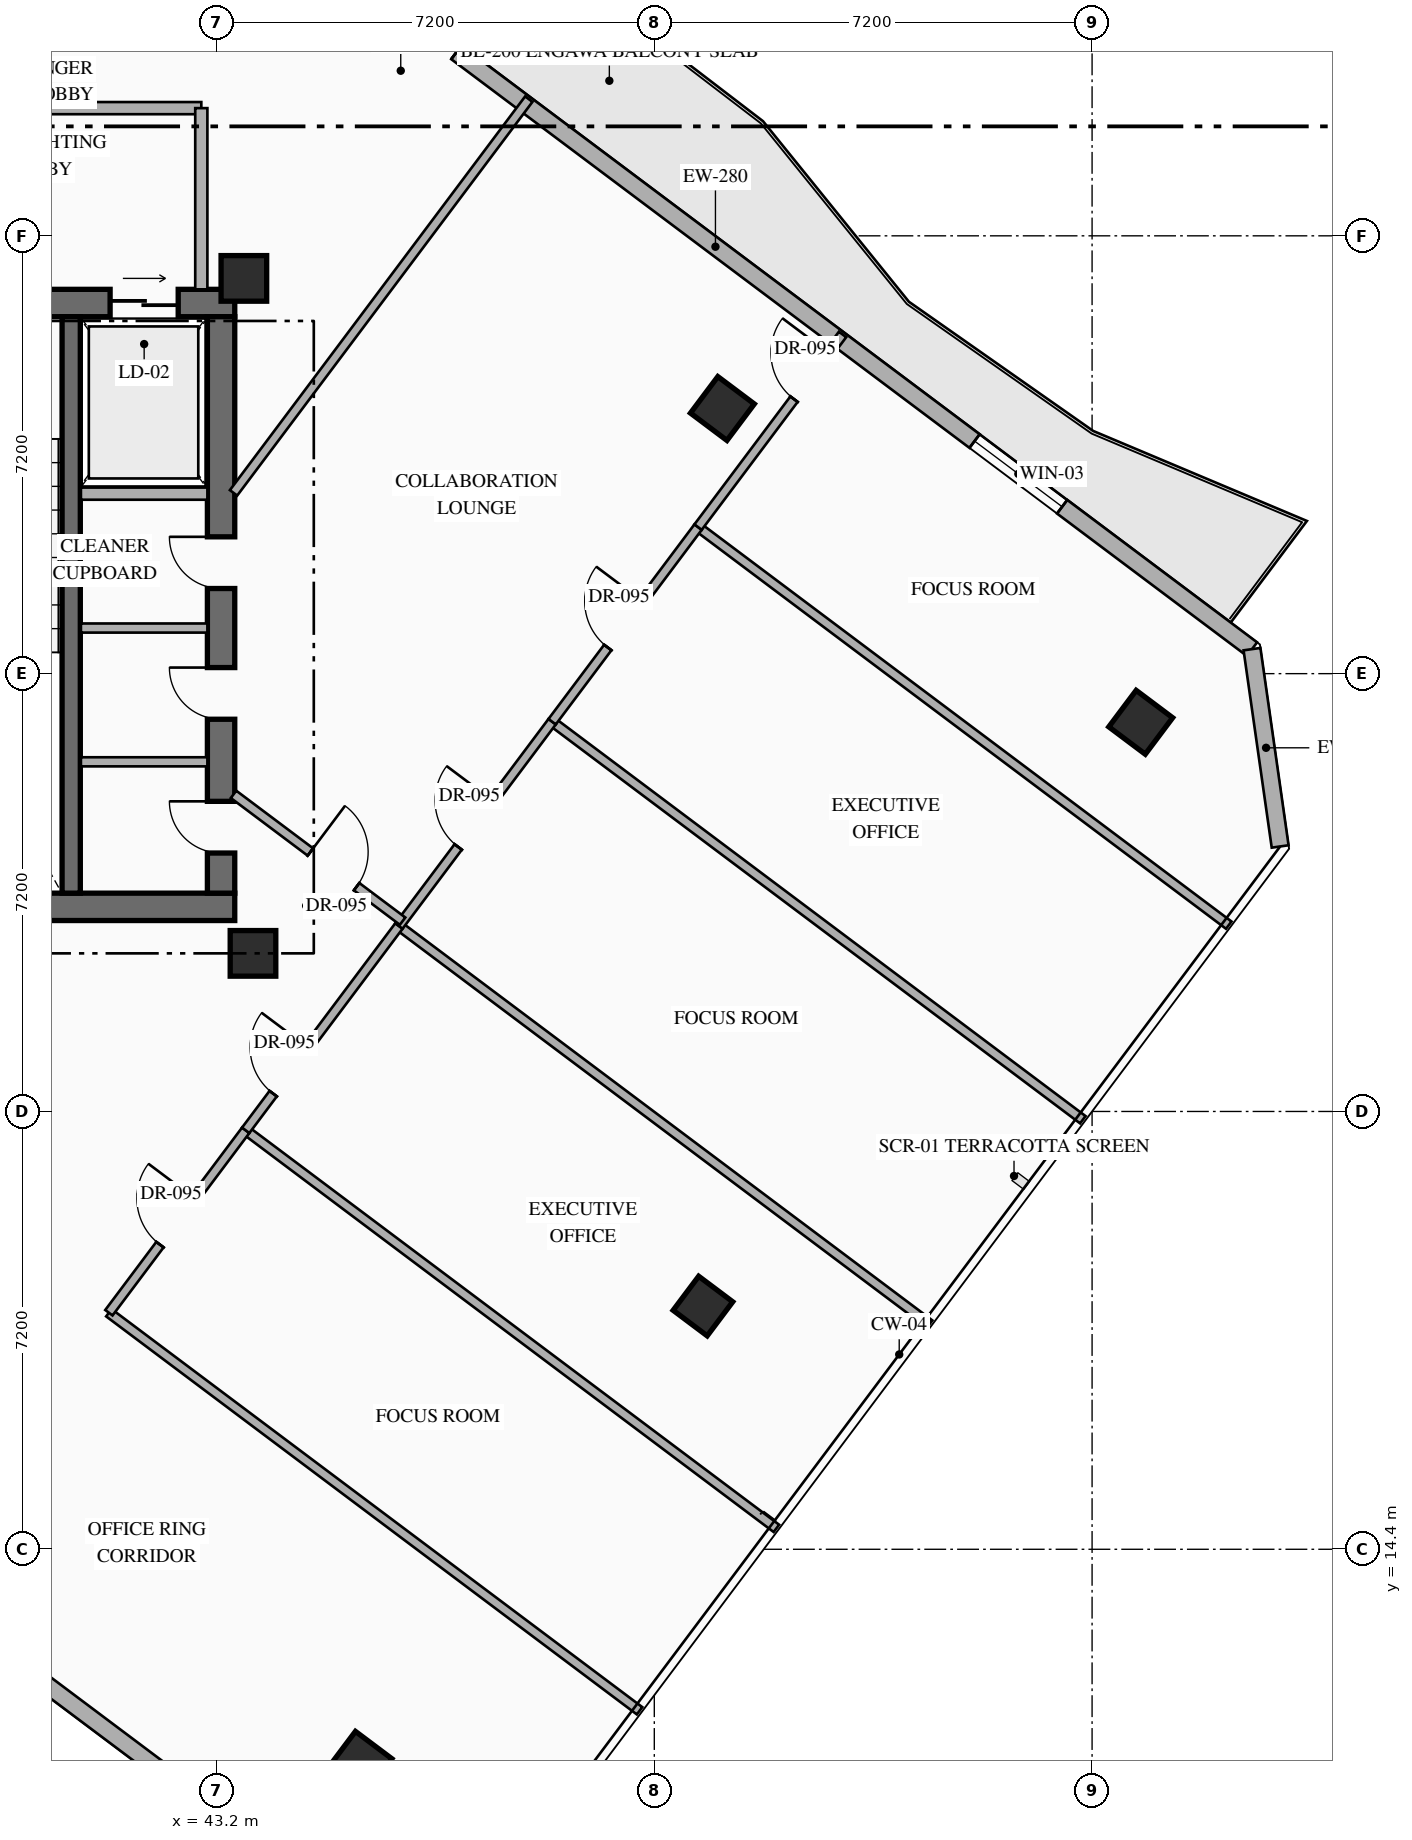
"""IFC4 building model, lengths in metres.
Left out: names, types, materials, properties, quantities, classifications, styles, units other than length and angle.
Written with IfcOpenShell. Run it as: python <this file> out.ifc"""

import sys

from ifc_helpers import new_model, si_unit, direction, frame, frame_2d, origin, origin_2d, place, context, subcontext, project, spatial, rectangle, hollow_rectangle, extrude, element, fill, save


model = new_model("IFC4")
c1 = context("Model", 3, precision=1e-05, world=origin(), true_north=direction((0.0, 1.0)))
c2 = subcontext(c1, "Body", "Model", "MODEL_VIEW")
j1 = project(units=[si_unit("LENGTHUNIT", "METRE"), si_unit("PLANEANGLEUNIT", "RADIAN")], contexts=[c1])
p1 = place(None, origin())
s1 = spatial("IfcSite", under=j1, at=p1, CompositionType="ELEMENT")
p2 = place(p1, origin())
s2 = spatial("IfcBuilding", under=s1, at=p2, CompositionType="ELEMENT")
p3 = place(p2, frame((0.0, 0.0, 195.15)))
s3 = spatial("IfcBuildingStorey", under=s2, at=p3, CompositionType="ELEMENT", Elevation=195.15)
p4 = place(p3, frame((36.04, 24.965, 0.0), z_axis=(0.0, 0.0, 1.0), x_axis=(1.0, 0.0, 0.0)))
e1 = element("IfcWall", 1, at=p4, inside=s3, PredefinedType="SHEAR", context=c2, shape_type="SweptSolid", body=[
    extrude(rectangle(XDim=7.46, YDim=0.45, at=frame_2d((3.73, 0.0))), origin(), (0.0, 0.0, 1.0), 3.6),
])
p5 = place(p3, frame((36.04, 34.895, 0.0), z_axis=(0.0, 0.0, 1.0), x_axis=(1.0, 0.0, 0.0)))
e2 = element("IfcWall", 2, at=p5, inside=s3, PredefinedType="SHEAR", context=c2, shape_type="SweptSolid", body=[
    extrude(rectangle(XDim=7.46, YDim=0.45, at=frame_2d((3.73, 0.0))), origin(), (0.0, 0.0, 1.0), 3.6),
])
p6 = place(p5, frame((2.51, 0.0, 0.0)))
e3 = element("IfcOpeningElement", 3, at=p6, cuts=e2, PredefinedType="OPENING", context=c2, shape_type="SweptSolid", body=[
    extrude(rectangle(XDim=1.1, YDim=2.2, at=frame_2d((0.55, 1.1))), frame((0.0, 0.235, 0.0), z_axis=(0.0, -1.0, 0.0), x_axis=(1.0, 0.0, 0.0)), (0.0, 0.0, 1.0), 0.47),
])
p7 = place(p5, frame((5.41, 0.0, 0.0)))
e4 = element("IfcOpeningElement", 4, at=p7, cuts=e2, PredefinedType="OPENING", context=c2, shape_type="SweptSolid", body=[
    extrude(rectangle(XDim=1.12, YDim=2.15, at=frame_2d((0.56, 1.075))), frame((0.0, 0.235, 0.0), z_axis=(0.0, -1.0, 0.0), x_axis=(1.0, 0.0, 0.0)), (0.0, 0.0, 1.0), 0.47),
])
p8 = place(p3, frame((43.275, 25.19, 0.0), z_axis=(0.0, 0.0, 1.0), x_axis=(0.0, 1.0, 0.0)))
e5 = element("IfcWall", 5, at=p8, inside=s3, PredefinedType="SHEAR", context=c2, shape_type="SweptSolid", body=[
    extrude(rectangle(XDim=9.48, YDim=0.45, at=frame_2d((4.74, 0.0))), origin(), (0.0, 0.0, 1.0), 3.6),
])
p9 = place(p8, frame((0.66, 0.0, 0.0)))
e6 = element("IfcOpeningElement", 6, at=p9, cuts=e5, PredefinedType="OPENING", context=c2, shape_type="SweptSolid", body=[
    extrude(rectangle(XDim=0.85, YDim=2.08, at=frame_2d((0.425, 1.04))), frame((0.0, 0.235, 0.0), z_axis=(0.0, -1.0, 0.0), x_axis=(1.0, 0.0, 0.0)), (0.0, 0.0, 1.0), 0.47),
])
p10 = place(p8, frame((2.86, 0.0, 0.0)))
e7 = element("IfcOpeningElement", 7, at=p10, cuts=e5, PredefinedType="OPENING", context=c2, shape_type="SweptSolid", body=[
    extrude(rectangle(XDim=0.85, YDim=2.08, at=frame_2d((0.425, 1.04))), frame((0.0, 0.235, 0.0), z_axis=(0.0, -1.0, 0.0), x_axis=(1.0, 0.0, 0.0)), (0.0, 0.0, 1.0), 0.47),
])
p11 = place(p8, frame((5.01, 0.0, 0.0)))
e8 = element("IfcOpeningElement", 8, at=p11, cuts=e5, PredefinedType="OPENING", context=c2, shape_type="SweptSolid", body=[
    extrude(rectangle(XDim=0.85, YDim=2.08, at=frame_2d((0.425, 1.04))), frame((0.0, 0.235, 0.0), z_axis=(0.0, -1.0, 0.0), x_axis=(1.0, 0.0, 0.0)), (0.0, 0.0, 1.0), 0.47),
])
p12 = place(p3, frame((40.81, 25.19, 0.0), z_axis=(0.0, 0.0, 1.0), x_axis=(0.0, 1.0, 0.0)))
e9 = element("IfcWall", 9, at=p12, inside=s3, PredefinedType="SHEAR", context=c2, shape_type="SweptSolid", body=[
    extrude(rectangle(XDim=9.48, YDim=0.3, at=frame_2d((4.74, 0.0))), origin(), (0.0, 0.0, 1.0), 3.6),
])
for number, where, z_axis, x_axis in (
    (10, (43.8, 24.2, 0.0), (0.0, 0.0, 1.0), (1.0, 0.0, 0.0)),
    (11, (43.65, 35.3, 0.0), (0.0, 0.0, 1.0), (1.0, 0.0, 0.0)),
    (12, (51.52, 33.16, 0.0), (0.0, 0.0, 1.0), (0.8, -0.6, 0.0)),
    (13, (45.56, 10.88, 0.0), (0.0, 0.0, 1.0), (0.8, -0.6, 0.0)),
    (14, (58.4, 28.0, 0.0), (0.0, 0.0, 1.0), (0.8, -0.6, 0.0)),
):
    element("IfcColumn", number, at=place(p3, frame(where, z_axis=z_axis, x_axis=x_axis)), inside=s3, PredefinedType="COLUMN", context=c2, shape_type="SweptSolid", body=[
        extrude(hollow_rectangle(XDim=0.75, YDim=0.75, WallThickness=0.028, at=origin_2d()), origin(), (0.0, 0.0, 1.0), 3.6),
    ])
p13 = place(p3, frame((51.2, 18.4, 0.0), z_axis=(0.0, 0.0, 1.0), x_axis=(0.799999996291, -0.600000004945, 0.0)))
e15 = element("IfcColumn", 15, at=p13, inside=s3, PredefinedType="COLUMN", context=c2, shape_type="SweptSolid", body=[
    extrude(hollow_rectangle(XDim=0.7, YDim=0.7, WallThickness=0.028, at=origin_2d()), origin(), (0.0, 0.0, 1.0), 3.6),
])
p14 = place(p3, frame((44.86, 40.73, 0.0), z_axis=(0.0, 0.0, 1.0), x_axis=(0.800007624502, -0.599989833863, 0.0)))
e16 = element("IfcWall", 16, at=p14, inside=s3, PredefinedType="STANDARD", context=c2, shape_type="SweptSolid", body=[
    extrude(rectangle(XDim=19.212, YDim=0.28, at=frame_2d((9.606, 0.0))), origin(), (0.0, 0.0, 1.0), 3.35),
])
p15 = place(p14, frame((1.755, 0.0, 0.0)))
e17 = element("IfcOpeningElement", 17, at=p15, cuts=e16, PredefinedType="OPENING", context=c2, shape_type="SweptSolid", body=[
    extrude(rectangle(XDim=1.1, YDim=2.2, at=frame_2d((0.55, 1.1))), frame((0.0, 0.15, 0.0), z_axis=(0.0, -1.0, 0.0), x_axis=(1.0, 0.0, 0.0)), (0.0, 0.0, 1.0), 0.3),
])
p16 = place(p14, frame((13.509, 0.0, 0.85)))
e18 = element("IfcOpeningElement", 18, at=p16, cuts=e16, PredefinedType="OPENING", context=c2, shape_type="SweptSolid", body=[
    extrude(rectangle(XDim=1.8, YDim=2.1, at=frame_2d((0.9, 1.05))), frame((0.0, 0.15, 0.0), z_axis=(0.0, -1.0, 0.0), x_axis=(1.0, 0.0, 0.0)), (0.0, 0.0, 1.0), 0.3),
])
p17 = place(p3, frame((60.23, 29.203, 0.0), z_axis=(0.0, 0.0, 1.0), x_axis=(0.141296221922, -0.989967361922, 0.0)))
e19 = element("IfcWall", 19, at=p17, inside=s3, PredefinedType="STANDARD", context=c2, shape_type="SweptSolid", body=[
    extrude(rectangle(XDim=3.278, YDim=0.28, at=frame_2d((1.639, 0.0))), origin(), (0.0, 0.0, 1.0), 3.35),
])
p18 = place(p3, frame((44.918, 8.787, 0.0), z_axis=(0.0, 0.0, 1.0), x_axis=(-0.800004765927, 0.599993645378, 0.0)))
e20 = element("IfcWall", 20, at=p18, inside=s3, PredefinedType="STANDARD", context=c2, shape_type="SweptSolid", body=[
    extrude(rectangle(XDim=24.588, YDim=0.28, at=frame_2d((12.294, 0.0))), origin(), (0.0, 0.0, 1.0), 3.35),
])
p19 = place(p3, frame((40.97, 31.76, 0.0), z_axis=(0.0, 0.0, 1.0), x_axis=(1.0, 0.0, 0.0)))
e21 = element("IfcWall", 21, at=p19, inside=s3, PredefinedType="STANDARD", context=c2, shape_type="SweptSolid", body=[
    extrude(rectangle(XDim=2.08, YDim=0.2, at=frame_2d((1.04, 0.0))), origin(), (0.0, 0.0, 1.0), 3.35),
])
for number, where, z_axis, x_axis in (
    (22, (40.97, 27.35, 0.0), (0.0, 0.0, 1.0), (1.0, 0.0, 0.0)),
    (23, (40.97, 29.55, 0.0), (0.0, 0.0, 1.0), (1.0, 0.0, 0.0)),
):
    element("IfcWall", number, at=place(p3, frame(where, z_axis=z_axis, x_axis=x_axis)), inside=s3, PredefinedType="PARTITIONING", context=c2, shape_type="SweptSolid", body=[
        extrude(rectangle(XDim=2.08, YDim=0.15, at=frame_2d((1.04, 0.0))), origin(), (0.0, 0.0, 1.0), 3.35),
    ])
p20 = place(p3, frame((37.65, 38.1, 0.0), z_axis=(0.0, 0.0, 1.0), x_axis=(1.0, 0.0, 0.0)))
e24 = element("IfcWall", 24, at=p20, inside=s3, PredefinedType="STANDARD", context=c2, shape_type="SweptSolid", body=[
    extrude(rectangle(XDim=5.3, YDim=0.2, at=frame_2d((2.65, 0.0))), origin(), (0.0, 0.0, 1.0), 3.35),
])
p21 = place(p3, frame((42.95, 35.12, 0.0), z_axis=(0.0, 0.0, 1.0), x_axis=(0.0, 1.0, 0.0)))
e25 = element("IfcWall", 25, at=p21, inside=s3, PredefinedType="STANDARD", context=c2, shape_type="SweptSolid", body=[
    extrude(rectangle(XDim=2.98, YDim=0.2, at=frame_2d((1.49, 0.0))), origin(), (0.0, 0.0, 1.0), 3.35),
])
for number, where, z_axis, x_axis in (
    (26, (41.43, 18.29, 0.0), (0.0, 0.0, 1.0), (0.8, -0.6, 0.0)),
    (27, (43.68, 21.29, 0.0), (0.0, 0.0, 1.0), (0.8, -0.6, 0.0)),
):
    element("IfcWall", number, at=place(p3, frame(where, z_axis=z_axis, x_axis=x_axis)), inside=s3, PredefinedType="PARTITIONING", context=c2, shape_type="SweptSolid", body=[
        extrude(rectangle(XDim=10.91, YDim=0.15, at=frame_2d((5.455, 0.0))), origin(), (0.0, 0.0, 1.0), 3.35),
    ])
p22 = place(p3, frame((41.43, 18.29, 0.0), z_axis=(0.0, 0.0, 1.0), x_axis=(0.6, 0.8, 0.0)))
e28 = element("IfcWall", 28, at=p22, inside=s3, PredefinedType="PARTITIONING", context=c2, shape_type="SweptSolid", body=[
    extrude(rectangle(XDim=3.75, YDim=0.15, at=frame_2d((1.875, 0.0))), origin(), (0.0, 0.0, 1.0), 3.35),
])
p23 = place(p22, frame((1.4, 0.0, 0.0)))
e29 = element("IfcOpeningElement", 29, at=p23, cuts=e28, PredefinedType="OPENING", context=c2, shape_type="SweptSolid", body=[
    extrude(rectangle(XDim=0.95, YDim=2.15, at=frame_2d((0.475, 1.075))), frame((0.0, 0.085, 0.0), z_axis=(0.0, -1.0, 0.0), x_axis=(1.0, 0.0, 0.0)), (0.0, 0.0, 1.0), 0.17),
])
p24 = place(p3, frame((46.2, 24.65, 0.0), z_axis=(0.0, 0.0, 1.0), x_axis=(0.800005370633, -0.599992839089, 0.0)))
e30 = element("IfcWall", 30, at=p24, inside=s3, PredefinedType="PARTITIONING", context=c2, shape_type="SweptSolid", body=[
    extrude(rectangle(XDim=10.91, YDim=0.15, at=frame_2d((5.455, 0.0))), origin(), (0.0, 0.0, 1.0), 3.35),
])
p25 = place(p3, frame((43.68, 21.29, 0.0), z_axis=(0.0, 0.0, 1.0), x_axis=(0.600018601461, 0.799986048566, 0.0)))
e31 = element("IfcWall", 31, at=p25, inside=s3, PredefinedType="PARTITIONING", context=c2, shape_type="SweptSolid", body=[
    extrude(rectangle(XDim=4.2, YDim=0.15, at=frame_2d((2.1, 0.0))), origin(), (0.0, 0.0, 1.0), 3.35),
])
p26 = place(p25, frame((0.754, 0.0, 0.0)))
e32 = element("IfcOpeningElement", 32, at=p26, cuts=e31, PredefinedType="OPENING", context=c2, shape_type="SweptSolid", body=[
    extrude(rectangle(XDim=0.95, YDim=2.15, at=frame_2d((0.475, 1.075))), frame((0.0, 0.085, 0.0), z_axis=(0.0, -1.0, 0.0), x_axis=(1.0, 0.0, 0.0)), (0.0, 0.0, 1.0), 0.17),
])
p27 = place(p3, frame((48.72, 28.01, 0.0), z_axis=(0.0, 0.0, 1.0), x_axis=(0.800005370633, -0.599992839089, 0.0)))
e33 = element("IfcWall", 33, at=p27, inside=s3, PredefinedType="PARTITIONING", context=c2, shape_type="SweptSolid", body=[
    extrude(rectangle(XDim=10.91, YDim=0.15, at=frame_2d((5.455, 0.0))), origin(), (0.0, 0.0, 1.0), 3.35),
])
p28 = place(p3, frame((46.2, 24.65, 0.0), z_axis=(0.0, 0.0, 1.0), x_axis=(0.59999069958, 0.80000697523, 0.0)))
e34 = element("IfcWall", 34, at=p28, inside=s3, PredefinedType="PARTITIONING", context=c2, shape_type="SweptSolid", body=[
    extrude(rectangle(XDim=4.2, YDim=0.15, at=frame_2d((2.1, 0.0))), origin(), (0.0, 0.0, 1.0), 3.35),
])
p29 = place(p28, frame((1.625, 0.0, 0.0)))
e35 = element("IfcOpeningElement", 35, at=p29, cuts=e34, PredefinedType="OPENING", context=c2, shape_type="SweptSolid", body=[
    extrude(rectangle(XDim=0.95, YDim=2.15, at=frame_2d((0.475, 1.075))), frame((0.0, 0.085, 0.0), z_axis=(0.0, -1.0, 0.0), x_axis=(1.0, 0.0, 0.0)), (0.0, 0.0, 1.0), 0.17),
])
p30 = place(p3, frame((51.12, 31.21, 0.0), z_axis=(0.0, 0.0, 1.0), x_axis=(0.799997314611, -0.600003580502, 0.0)))
e36 = element("IfcWall", 36, at=p30, inside=s3, PredefinedType="PARTITIONING", context=c2, shape_type="SweptSolid", body=[
    extrude(rectangle(XDim=10.91, YDim=0.15, at=frame_2d((5.455, 0.0))), origin(), (0.0, 0.0, 1.0), 3.045),
])
p31 = place(p3, frame((48.72, 28.01, 0.0), z_axis=(0.0, 0.0, 1.0), x_axis=(0.600029296115, 0.799978027076, 0.0)))
e37 = element("IfcWall", 37, at=p31, inside=s3, PredefinedType="PARTITIONING", context=c2, shape_type="SweptSolid", body=[
    extrude(rectangle(XDim=4.0, YDim=0.15, at=frame_2d((2.0, 0.0))), origin(), (0.0, 0.0, 1.0), 3.35),
])
p32 = place(p31, frame((1.525, 0.0, 0.0)))
e38 = element("IfcOpeningElement", 38, at=p32, cuts=e37, PredefinedType="OPENING", context=c2, shape_type="SweptSolid", body=[
    extrude(rectangle(XDim=0.95, YDim=2.15, at=frame_2d((0.475, 1.075))), frame((0.0, 0.085, 0.0), z_axis=(0.0, -1.0, 0.0), x_axis=(1.0, 0.0, 0.0)), (0.0, 0.0, 1.0), 0.17),
])
p33 = place(p3, frame((51.12, 31.21, 0.0), z_axis=(0.0, 0.0, 1.0), x_axis=(0.6, 0.8, 0.0)))
e39 = element("IfcWall", 39, at=p33, inside=s3, PredefinedType="PARTITIONING", context=c2, shape_type="SweptSolid", body=[
    extrude(rectangle(XDim=3.96, YDim=0.15, at=frame_2d((1.98, 0.0))), origin(), (0.0, 0.0, 1.0), 3.35),
])
p34 = place(p33, frame((2.63, 0.0, 0.0)))
e40 = element("IfcOpeningElement", 40, at=p34, cuts=e39, PredefinedType="OPENING", context=c2, shape_type="SweptSolid", body=[
    extrude(rectangle(XDim=0.95, YDim=2.15, at=frame_2d((0.475, 1.075))), frame((0.0, 0.085, 0.0), z_axis=(0.0, -1.0, 0.0), x_axis=(1.0, 0.0, 0.0)), (0.0, 0.0, 1.0), 0.17),
])
p35 = place(p3, frame((43.48, 26.815, 0.0), z_axis=(0.0, 0.0, 1.0), x_axis=(0.800008430676, -0.599988758934, 0.0)))
e41 = element("IfcWall", 41, at=p35, inside=s3, PredefinedType="PARTITIONING", context=c2, shape_type="SweptSolid", body=[
    extrude(rectangle(XDim=3.475, YDim=0.15, at=frame_2d((1.738, 0.0))), origin(), (0.0, 0.0, 1.0), 3.35),
])
p36 = place(p35, frame((1.58, 0.0, 0.0)))
e42 = element("IfcOpeningElement", 42, at=p36, cuts=e41, PredefinedType="OPENING", context=c2, shape_type="SweptSolid", body=[
    extrude(rectangle(XDim=0.95, YDim=2.15, at=frame_2d((0.475, 1.075))), frame((0.0, 0.085, 0.0), z_axis=(0.0, -1.0, 0.0), x_axis=(1.0, 0.0, 0.0)), (0.0, 0.0, 1.0), 0.17),
])
p37 = place(p3, frame((43.48, 31.773, 0.0), z_axis=(0.0, 0.0, 1.0), x_axis=(0.599971041729, 0.800021717885, 0.0)))
e43 = element("IfcWall", 43, at=p37, inside=s3, PredefinedType="PARTITIONING", context=c2, shape_type="SweptSolid", body=[
    extrude(rectangle(XDim=8.094, YDim=0.15, at=frame_2d((4.047, 0.0))), origin(), (0.0, 0.0, 1.0), 3.35),
])
p38 = place(p15, origin())
e44 = element("IfcDoor", 44, at=p38, inside=s3, OperationType="SINGLE_SWING_LEFT", PredefinedType="DOOR", context=c2, shape_type="SweptSolid", body=[
    extrude(rectangle(XDim=1.1, YDim=2.2, at=frame_2d((0.55, 1.1))), frame((0.0, 0.025, 0.0), z_axis=(0.0, -1.0, 0.0), x_axis=(1.0, 0.0, 0.0)), (0.0, 0.0, 1.0), 0.05),
])
fill(e17, e44)
p39 = place(p16, origin())
e45 = element("IfcWindow", 45, at=p39, inside=s3, PartitioningType="SINGLE_PANEL", PredefinedType="WINDOW", context=c2, shape_type="SweptSolid", body=[
    extrude(rectangle(XDim=1.8, YDim=2.1, at=frame_2d((0.9, 1.05))), frame((0.0, 0.03, 0.0), z_axis=(0.0, -1.0, 0.0), x_axis=(1.0, 0.0, 0.0)), (0.0, 0.0, 1.0), 0.06),
])
fill(e18, e45)
p40 = place(p7, origin())
e46 = element("IfcDoor", 46, at=p40, inside=s3, OperationType="SLIDING_TO_RIGHT", PredefinedType="USERDEFINED", context=c2, shape_type="SweptSolid", body=[
    extrude(rectangle(XDim=1.12, YDim=2.15, at=frame_2d((0.56, 1.075))), frame((0.0, 0.025, 0.0), z_axis=(0.0, -1.0, 0.0), x_axis=(1.0, 0.0, 0.0)), (0.0, 0.0, 1.0), 0.05),
])
fill(e4, e46)
p41 = place(p9, origin())
e47 = element("IfcDoor", 47, at=p41, inside=s3, OperationType="SINGLE_SWING_RIGHT", PredefinedType="DOOR", context=c2, shape_type="SweptSolid", body=[
    extrude(rectangle(XDim=0.85, YDim=2.08, at=frame_2d((0.425, 1.04))), frame((0.0, 0.025, 0.0), z_axis=(0.0, -1.0, 0.0), x_axis=(1.0, 0.0, 0.0)), (0.0, 0.0, 1.0), 0.05),
])
fill(e6, e47)
p42 = place(p10, origin())
e48 = element("IfcDoor", 48, at=p42, inside=s3, OperationType="SINGLE_SWING_RIGHT", PredefinedType="DOOR", context=c2, shape_type="SweptSolid", body=[
    extrude(rectangle(XDim=0.85, YDim=2.08, at=frame_2d((0.425, 1.04))), frame((0.0, 0.025, 0.0), z_axis=(0.0, -1.0, 0.0), x_axis=(1.0, 0.0, 0.0)), (0.0, 0.0, 1.0), 0.05),
])
fill(e7, e48)
p43 = place(p11, origin())
e49 = element("IfcDoor", 49, at=p43, inside=s3, OperationType="SINGLE_SWING_RIGHT", PredefinedType="DOOR", context=c2, shape_type="SweptSolid", body=[
    extrude(rectangle(XDim=0.85, YDim=2.08, at=frame_2d((0.425, 1.04))), frame((0.0, 0.025, 0.0), z_axis=(0.0, -1.0, 0.0), x_axis=(1.0, 0.0, 0.0)), (0.0, 0.0, 1.0), 0.05),
])
fill(e8, e49)
p44 = place(p23, origin())
e50 = element("IfcDoor", 50, at=p44, inside=s3, OperationType="SINGLE_SWING_RIGHT", PredefinedType="DOOR", context=c2, shape_type="SweptSolid", body=[
    extrude(rectangle(XDim=0.95, YDim=2.15, at=frame_2d((0.475, 1.075))), frame((0.0, 0.025, 0.0), z_axis=(0.0, -1.0, 0.0), x_axis=(1.0, 0.0, 0.0)), (0.0, 0.0, 1.0), 0.05),
])
fill(e29, e50)
p45 = place(p26, origin())
e51 = element("IfcDoor", 51, at=p45, inside=s3, OperationType="SINGLE_SWING_RIGHT", PredefinedType="DOOR", context=c2, shape_type="SweptSolid", body=[
    extrude(rectangle(XDim=0.95, YDim=2.15, at=frame_2d((0.475, 1.075))), frame((0.0, 0.025, 0.0), z_axis=(0.0, -1.0, 0.0), x_axis=(1.0, 0.0, 0.0)), (0.0, 0.0, 1.0), 0.05),
])
fill(e32, e51)
p46 = place(p29, origin())
e52 = element("IfcDoor", 52, at=p46, inside=s3, OperationType="SINGLE_SWING_RIGHT", PredefinedType="DOOR", context=c2, shape_type="SweptSolid", body=[
    extrude(rectangle(XDim=0.95, YDim=2.15, at=frame_2d((0.475, 1.075))), frame((0.0, 0.025, 0.0), z_axis=(0.0, -1.0, 0.0), x_axis=(1.0, 0.0, 0.0)), (0.0, 0.0, 1.0), 0.05),
])
fill(e35, e52)
p47 = place(p32, origin())
e53 = element("IfcDoor", 53, at=p47, inside=s3, OperationType="SINGLE_SWING_RIGHT", PredefinedType="DOOR", context=c2, shape_type="SweptSolid", body=[
    extrude(rectangle(XDim=0.95, YDim=2.15, at=frame_2d((0.475, 1.075))), frame((0.0, 0.025, 0.0), z_axis=(0.0, -1.0, 0.0), x_axis=(1.0, 0.0, 0.0)), (0.0, 0.0, 1.0), 0.05),
])
fill(e38, e53)
p48 = place(p34, origin())
e54 = element("IfcDoor", 54, at=p48, inside=s3, OperationType="SINGLE_SWING_RIGHT", PredefinedType="DOOR", context=c2, shape_type="SweptSolid", body=[
    extrude(rectangle(XDim=0.95, YDim=2.15, at=frame_2d((0.475, 1.075))), frame((0.0, 0.025, 0.0), z_axis=(0.0, -1.0, 0.0), x_axis=(1.0, 0.0, 0.0)), (0.0, 0.0, 1.0), 0.05),
])
fill(e40, e54)
p49 = place(p36, origin())
e55 = element("IfcDoor", 55, at=p49, inside=s3, OperationType="SINGLE_SWING_LEFT", PredefinedType="DOOR", context=c2, shape_type="SweptSolid", body=[
    extrude(rectangle(XDim=0.95, YDim=2.15, at=frame_2d((0.475, 1.075))), frame((0.0, 0.025, 0.0), z_axis=(0.0, -1.0, 0.0), x_axis=(1.0, 0.0, 0.0)), (0.0, 0.0, 1.0), 0.05),
])
fill(e42, e55)
save(model, sys.argv[1])
